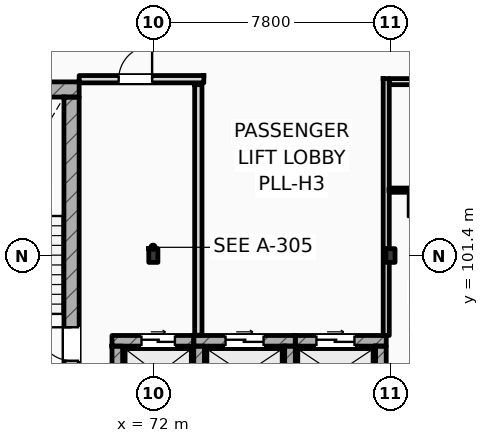
"""IFC4 building model, lengths in metres.
Left out: names, types, materials, properties, quantities, classifications, styles, units other than length and angle.
Written with IfcOpenShell. Run it as: python <this file> out.ifc"""

import sys

from ifc_helpers import new_model, si_unit, direction, frame, frame_2d, origin, origin_2d, place, context, subcontext, project, spatial, rectangle, i_section, extrude, element, fill, save


model = new_model("IFC4")
c1 = context("Model", 3, precision=1e-05, world=origin(), true_north=direction((0.0, 1.0)))
c2 = subcontext(c1, "Body", "Model", "MODEL_VIEW")
j1 = project(units=[si_unit("LENGTHUNIT", "METRE"), si_unit("PLANEANGLEUNIT", "RADIAN")], contexts=[c1])
p1 = place(None, origin())
s1 = spatial("IfcSite", under=j1, at=p1, CompositionType="ELEMENT")
p2 = place(p1, origin())
s2 = spatial("IfcBuilding", under=s1, at=p2, CompositionType="ELEMENT")
p3 = place(p2, frame((0.0, 0.0, 35.4)))
s3 = spatial("IfcBuildingStorey", under=s2, at=p3, CompositionType="ELEMENT", Elevation=35.4)
for number, where, z_axis, x_axis in (
    (1, (72.0, 101.4, 0.0), (0.0, 0.0, 1.0), (1.0, 0.0, 0.0)),
    (2, (79.8, 101.4, 0.0), (0.0, 0.0, 1.0), (1.0, 0.0, 0.0)),
):
    element("IfcColumn", number, at=place(p3, frame(where, z_axis=z_axis, x_axis=x_axis)), inside=s3, PredefinedType="COLUMN", context=c2, shape_type="SweptSolid", body=[
        extrude(i_section(OverallWidth=0.3, OverallDepth=0.45, WebThickness=0.014, FlangeThickness=0.026, FilletRadius=0.027, at=origin_2d()), origin(), (0.0, 0.0, 1.0), 3.6),
    ])
p4 = place(p3, frame((64.4, 106.862, 0.0), z_axis=(0.0, 0.0, 1.0), x_axis=(1.0, 0.0, 0.0)))
e3 = element("IfcWall", 3, at=p4, inside=s3, PredefinedType="SHEAR", context=c2, shape_type="SweptSolid", body=[
    extrude(rectangle(XDim=5.16, YDim=0.5, at=frame_2d((2.58, 0.0))), origin(), (0.0, 0.0, 1.0), 3.6),
])
p5 = place(p3, frame((69.31, 97.5, 0.0), z_axis=(0.0, 0.0, 1.0), x_axis=(0.0, 1.0, 0.0)))
e4 = element("IfcWall", 4, at=p5, inside=s3, PredefinedType="SHEAR", context=c2, shape_type="SweptSolid", body=[
    extrude(rectangle(XDim=9.112, YDim=0.5, at=frame_2d((4.556, 0.0))), origin(), (0.0, 0.0, 1.0), 3.6),
])
p6 = place(p5, frame((0.44, 0.0, 0.0)))
e5 = element("IfcOpeningElement", 5, at=p6, cuts=e4, PredefinedType="OPENING", context=c2, shape_type="SweptSolid", body=[
    extrude(rectangle(XDim=1.1, YDim=2.2, at=frame_2d((0.55, 1.1))), frame((0.0, 0.26, 0.0), z_axis=(0.0, -1.0, 0.0), x_axis=(1.0, 0.0, 0.0)), (0.0, 0.0, 1.0), 0.52),
])
p7 = place(p3, frame((70.64, 98.595, 0.0), z_axis=(0.0, 0.0, 1.0), x_axis=(1.0, 0.0, 0.0)))
e6 = element("IfcWall", 6, at=p7, inside=s3, PredefinedType="SHEAR", context=c2, shape_type="SweptSolid", body=[
    extrude(rectangle(XDim=2.69, YDim=0.35, at=frame_2d((1.345, 0.0))), origin(), (0.0, 0.0, 1.0), 3.38),
])
p8 = place(p7, frame((0.97, 0.0, 0.0)))
e7 = element("IfcOpeningElement", 7, at=p8, cuts=e6, PredefinedType="OPENING", context=c2, shape_type="SweptSolid", body=[
    extrude(rectangle(XDim=1.1, YDim=2.2, at=frame_2d((0.55, 1.1))), frame((0.0, 0.185, 0.0), z_axis=(0.0, -1.0, 0.0), x_axis=(1.0, 0.0, 0.0)), (0.0, 0.0, 1.0), 0.37),
])
p9 = place(p3, frame((70.815, 96.58, 0.0), z_axis=(0.0, 0.0, 1.0), x_axis=(0.0, 1.0, 0.0)))
e8 = element("IfcWall", 8, at=p9, inside=s3, PredefinedType="SHEAR", context=c2, shape_type="SweptSolid", body=[
    extrude(rectangle(XDim=1.84, YDim=0.35, at=frame_2d((0.92, 0.0))), origin(), (0.0, 0.0, 1.0), 3.38),
])
p10 = place(p3, frame((73.33, 98.595, 0.0), z_axis=(0.0, 0.0, 1.0), x_axis=(1.0, 0.0, 0.0)))
e9 = element("IfcWall", 9, at=p10, inside=s3, PredefinedType="SHEAR", context=c2, shape_type="SweptSolid", body=[
    extrude(rectangle(XDim=3.34, YDim=0.35, at=frame_2d((1.67, 0.0))), origin(), (0.0, 0.0, 1.0), 3.38),
])
p11 = place(p10, frame((1.045, 0.0, 0.0)))
e10 = element("IfcOpeningElement", 10, at=p11, cuts=e9, PredefinedType="OPENING", context=c2, shape_type="SweptSolid", body=[
    extrude(rectangle(XDim=1.25, YDim=2.25, at=frame_2d((0.625, 1.125))), frame((0.0, 0.185, 0.0), z_axis=(0.0, -1.0, 0.0), x_axis=(1.0, 0.0, 0.0)), (0.0, 0.0, 1.0), 0.37),
])
for number, where, z_axis, x_axis in (
    (11, (73.505, 96.58, 0.0), (0.0, 0.0, 1.0), (0.0, 1.0, 0.0)),
    (12, (76.495, 96.58, 0.0), (0.0, 0.0, 1.0), (0.0, 1.0, 0.0)),
):
    element("IfcWall", number, at=place(p3, frame(where, z_axis=z_axis, x_axis=x_axis)), inside=s3, PredefinedType="SHEAR", context=c2, shape_type="SweptSolid", body=[
        extrude(rectangle(XDim=1.84, YDim=0.35, at=frame_2d((0.92, 0.0))), origin(), (0.0, 0.0, 1.0), 3.38),
    ])
p12 = place(p3, frame((76.67, 98.595, 0.0), z_axis=(0.0, 0.0, 1.0), x_axis=(1.0, 0.0, 0.0)))
e13 = element("IfcWall", 13, at=p12, inside=s3, PredefinedType="SHEAR", context=c2, shape_type="SweptSolid", body=[
    extrude(rectangle(XDim=2.99, YDim=0.35, at=frame_2d((1.495, 0.0))), origin(), (0.0, 0.0, 1.0), 3.38),
])
p13 = place(p12, frame((0.695, 0.0, 0.0)))
e14 = element("IfcOpeningElement", 14, at=p13, cuts=e13, PredefinedType="OPENING", context=c2, shape_type="SweptSolid", body=[
    extrude(rectangle(XDim=1.25, YDim=2.25, at=frame_2d((0.625, 1.125))), frame((0.0, 0.185, 0.0), z_axis=(0.0, -1.0, 0.0), x_axis=(1.0, 0.0, 0.0)), (0.0, 0.0, 1.0), 0.37),
])
p14 = place(p3, frame((79.485, 96.58, 0.0), z_axis=(0.0, 0.0, 1.0), x_axis=(0.0, 1.0, 0.0)))
e15 = element("IfcWall", 15, at=p14, inside=s3, PredefinedType="SHEAR", context=c2, shape_type="SweptSolid", body=[
    extrude(rectangle(XDim=1.84, YDim=0.35, at=frame_2d((0.92, 0.0))), origin(), (0.0, 0.0, 1.0), 3.01),
])
p15 = place(p3, frame((73.48, 98.78, 0.0), z_axis=(0.0, 0.0, 1.0), x_axis=(0.0, 1.0, 0.0)))
e16 = element("IfcWall", 16, at=p15, inside=s3, PredefinedType="STANDARD", context=c2, shape_type="SweptSolid", body=[
    extrude(rectangle(XDim=8.24, YDim=0.24, at=frame_2d((4.12, 0.0))), origin(), (0.0, 0.0, 1.0), 3.38),
])
p16 = place(p3, frame((69.56, 107.2, 0.0), z_axis=(0.0, 0.0, 1.0), x_axis=(1.0, 0.0, 0.0)))
e17 = element("IfcWall", 17, at=p16, inside=s3, PredefinedType="STANDARD", context=c2, shape_type="SweptSolid", body=[
    extrude(rectangle(XDim=4.1, YDim=0.24, at=frame_2d((2.05, 0.0))), origin(), (0.0, 0.0, 1.0), 3.38),
])
p17 = place(p16, frame((1.3, 0.0, 0.0)))
e18 = element("IfcOpeningElement", 18, at=p17, cuts=e17, PredefinedType="OPENING", context=c2, shape_type="SweptSolid", body=[
    extrude(rectangle(XDim=1.1, YDim=2.2, at=frame_2d((0.55, 1.1))), frame((0.0, 0.13, 0.0), z_axis=(0.0, -1.0, 0.0), x_axis=(1.0, 0.0, 0.0)), (0.0, 0.0, 1.0), 0.26),
])
p18 = place(p3, frame((79.76, 107.12, 0.0), z_axis=(0.0, 0.0, 1.0), x_axis=(1.0, 0.0, 0.0)))
e19 = element("IfcWall", 19, at=p18, inside=s3, PredefinedType="PARTITIONING", context=c2, shape_type="SweptSolid", body=[
    extrude(rectangle(XDim=15.5, YDim=0.2, at=frame_2d((7.75, 0.0))), origin(), (0.0, 0.0, 1.0), 3.38),
])
p19 = place(p18, frame((2.419, 0.0, 0.0)))
e20 = element("IfcOpeningElement", 20, at=p19, cuts=e19, PredefinedType="OPENING", context=c2, shape_type="SweptSolid", body=[
    extrude(rectangle(XDim=0.96, YDim=2.2, at=frame_2d((0.48, 1.1))), frame((0.0, 0.11, 0.0), z_axis=(0.0, -1.0, 0.0), x_axis=(1.0, 0.0, 0.0)), (0.0, 0.0, 1.0), 0.22),
])
p20 = place(p18, frame((4.117, 0.0, 0.0)))
e21 = element("IfcOpeningElement", 21, at=p20, cuts=e19, PredefinedType="OPENING", context=c2, shape_type="SweptSolid", body=[
    extrude(rectangle(XDim=0.96, YDim=2.2, at=frame_2d((0.48, 1.1))), frame((0.0, 0.11, 0.0), z_axis=(0.0, -1.0, 0.0), x_axis=(1.0, 0.0, 0.0)), (0.0, 0.0, 1.0), 0.22),
])
p21 = place(p18, frame((10.08, 0.0, 0.0)))
e22 = element("IfcOpeningElement", 22, at=p21, cuts=e19, PredefinedType="OPENING", context=c2, shape_type="SweptSolid", body=[
    extrude(rectangle(XDim=0.96, YDim=2.2, at=frame_2d((0.48, 1.1))), frame((0.0, 0.11, 0.0), z_axis=(0.0, -1.0, 0.0), x_axis=(1.0, 0.0, 0.0)), (0.0, 0.0, 1.0), 0.22),
])
p22 = place(p18, frame((11.706, 0.0, 0.0)))
e23 = element("IfcOpeningElement", 23, at=p22, cuts=e19, PredefinedType="OPENING", context=c2, shape_type="SweptSolid", body=[
    extrude(rectangle(XDim=0.96, YDim=2.2, at=frame_2d((0.48, 1.1))), frame((0.0, 0.11, 0.0), z_axis=(0.0, -1.0, 0.0), x_axis=(1.0, 0.0, 0.0)), (0.0, 0.0, 1.0), 0.22),
])
p23 = place(p3, frame((79.66, 98.77, 0.0), z_axis=(0.0, 0.0, 1.0), x_axis=(0.0, 1.0, 0.0)))
e24 = element("IfcWall", 24, at=p23, inside=s3, PredefinedType="PARTITIONING", context=c2, shape_type="SweptSolid", body=[
    extrude(rectangle(XDim=8.45, YDim=0.2, at=frame_2d((4.225, 0.0))), origin(), (0.0, 0.0, 1.0), 3.01),
])
p24 = place(p3, frame((79.75, 103.55, 0.0), z_axis=(0.0, 0.0, 1.0), x_axis=(1.0, 0.0, 0.0)))
e25 = element("IfcWall", 25, at=p24, inside=s3, PredefinedType="PARTITIONING", context=c2, shape_type="SweptSolid", body=[
    extrude(rectangle(XDim=2.15, YDim=0.14, at=frame_2d((1.075, 0.0))), origin(), (0.0, 0.0, 1.0), 3.38),
])
p25 = place(p24, frame((0.625, 0.0, 0.0)))
e26 = element("IfcOpeningElement", 26, at=p25, cuts=e25, PredefinedType="OPENING", context=c2, shape_type="SweptSolid", body=[
    extrude(rectangle(XDim=0.9, YDim=2.1, at=frame_2d((0.45, 1.05))), frame((0.0, 0.08, 0.0), z_axis=(0.0, -1.0, 0.0), x_axis=(1.0, 0.0, 0.0)), (0.0, 0.0, 1.0), 0.16),
])
p26 = place(p6, origin())
e27 = element("IfcDoor", 27, at=p26, inside=s3, OperationType="SINGLE_SWING_RIGHT", PredefinedType="DOOR", context=c2, shape_type="SweptSolid", body=[
    extrude(rectangle(XDim=1.1, YDim=2.2, at=frame_2d((0.55, 1.1))), frame((0.0, 0.025, 0.0), z_axis=(0.0, -1.0, 0.0), x_axis=(1.0, 0.0, 0.0)), (0.0, 0.0, 1.0), 0.05),
])
fill(e5, e27)
p27 = place(p8, origin())
e28 = element("IfcDoor", 28, at=p27, inside=s3, OperationType="SLIDING_TO_LEFT", PredefinedType="DOOR", context=c2, shape_type="SweptSolid", body=[
    extrude(rectangle(XDim=1.1, YDim=2.2, at=frame_2d((0.55, 1.1))), frame((0.0, 0.025, 0.0), z_axis=(0.0, -1.0, 0.0), x_axis=(1.0, 0.0, 0.0)), (0.0, 0.0, 1.0), 0.05),
])
fill(e7, e28)
p28 = place(p11, origin())
e29 = element("IfcDoor", 29, at=p28, inside=s3, OperationType="SLIDING_TO_LEFT", PredefinedType="DOOR", context=c2, shape_type="SweptSolid", body=[
    extrude(rectangle(XDim=1.25, YDim=2.25, at=frame_2d((0.625, 1.125))), frame((0.0, 0.025, 0.0), z_axis=(0.0, -1.0, 0.0), x_axis=(1.0, 0.0, 0.0)), (0.0, 0.0, 1.0), 0.05),
])
fill(e10, e29)
p29 = place(p13, origin())
e30 = element("IfcDoor", 30, at=p29, inside=s3, OperationType="SLIDING_TO_LEFT", PredefinedType="DOOR", context=c2, shape_type="SweptSolid", body=[
    extrude(rectangle(XDim=1.25, YDim=2.25, at=frame_2d((0.625, 1.125))), frame((0.0, 0.025, 0.0), z_axis=(0.0, -1.0, 0.0), x_axis=(1.0, 0.0, 0.0)), (0.0, 0.0, 1.0), 0.05),
])
fill(e14, e30)
p30 = place(p17, origin())
e31 = element("IfcDoor", 31, at=p30, inside=s3, OperationType="SINGLE_SWING_RIGHT", PredefinedType="DOOR", context=c2, shape_type="SweptSolid", body=[
    extrude(rectangle(XDim=1.1, YDim=2.2, at=frame_2d((0.55, 1.1))), frame((0.0, 0.025, 0.0), z_axis=(0.0, -1.0, 0.0), x_axis=(1.0, 0.0, 0.0)), (0.0, 0.0, 1.0), 0.05),
])
fill(e18, e31)
p31 = place(p25, frame((0.9, 0.0, 0.0), z_axis=(0.0, 0.0, 1.0), x_axis=(-1.0, 0.0, 0.0)))
e32 = element("IfcDoor", 32, at=p31, inside=s3, OperationType="SINGLE_SWING_LEFT", PredefinedType="DOOR", context=c2, shape_type="SweptSolid", body=[
    extrude(rectangle(XDim=0.9, YDim=2.1, at=frame_2d((0.45, 1.05))), frame((0.0, 0.025, 0.0), z_axis=(0.0, -1.0, 0.0), x_axis=(1.0, 0.0, 0.0)), (0.0, 0.0, 1.0), 0.05),
])
fill(e26, e32)
save(model, sys.argv[1])
